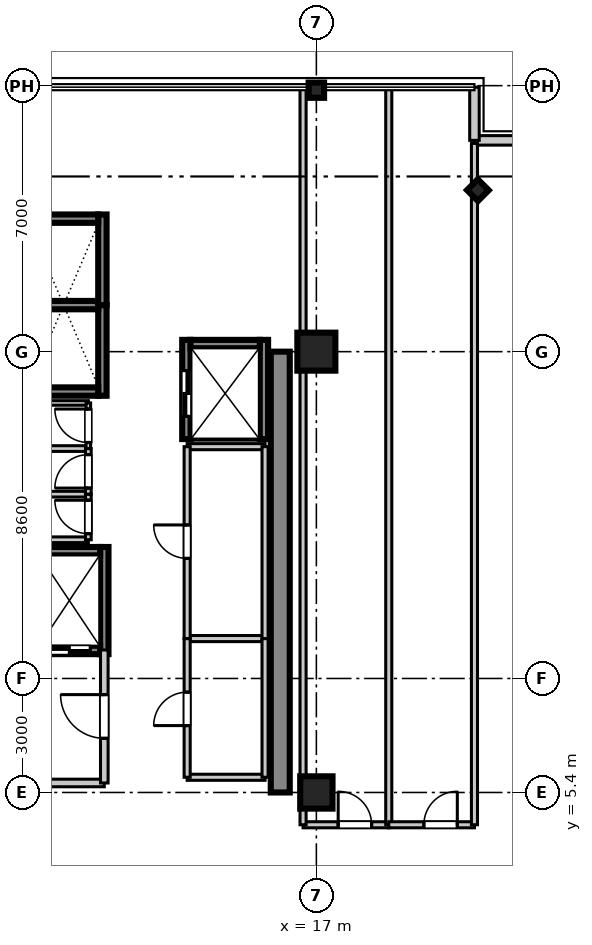
"""IFC4 building model, lengths in metres.
Left out: names, types, materials, properties, quantities, classifications, styles, units other than length and angle.
Written with IfcOpenShell. Run it as: python <this file> out.ifc"""

import sys

from ifc_helpers import new_model, si_unit, direction, frame, frame_2d, origin, origin_2d, place, context, subcontext, project, spatial, rectangle, i_section, extrude, source, transform, mapped, element, fill, save


model = new_model("IFC4")
c1 = context("Model", 3, precision=1e-05, world=origin(), true_north=direction((0.0, 1.0)))
c2 = subcontext(c1, "Body", "Model", "MODEL_VIEW")
j1 = project(units=[si_unit("LENGTHUNIT", "METRE"), si_unit("PLANEANGLEUNIT", "RADIAN")], contexts=[c1])
p1 = place(None, origin())
s1 = spatial("IfcSite", under=j1, at=p1, CompositionType="ELEMENT")
p2 = place(p1, origin())
s2 = spatial("IfcBuilding", under=s1, at=p2, CompositionType="ELEMENT")
p3 = place(p2, frame((0.0, 0.0, 234.5)))
s3 = spatial("IfcBuildingStorey", under=s2, at=p3, CompositionType="ELEMENT", Elevation=234.5)
m1 = source(origin(), c2, "Body", "SweptSolid", [
    extrude(rectangle(XDim=0.85, YDim=0.85, at=origin_2d()), origin(), (0.0, 0.0, 1.0), 3.655),
])
p4 = place(p3, frame((17.0, 5.4, 0.0), z_axis=(0.0, 0.0, 1.0), x_axis=(1.0, 0.0, 0.0)))
e1 = element("IfcColumn", 1, at=p4, inside=s3, PredefinedType="PILASTER", context=c2, shape_type="MappedRepresentation", body=[
    mapped(m1, transform((0.0, 0.0, 0.0), scale=1.0)),
])
m2 = source(origin(), c2, "Body", "SweptSolid", [
    extrude(rectangle(XDim=1.0, YDim=1.0, at=origin_2d()), origin(), (0.0, 0.0, 1.0), 3.655),
])
p5 = place(p3, frame((17.0, 17.0, 0.0), z_axis=(0.0, 0.0, 1.0), x_axis=(1.0, 0.0, 0.0)))
e2 = element("IfcColumn", 2, at=p5, inside=s3, PredefinedType="COLUMN", context=c2, shape_type="MappedRepresentation", body=[
    mapped(m2, transform((0.0, 0.0, 0.0), scale=1.0)),
])
m3 = source(origin(), c2, "Body", "SweptSolid", [
    extrude(i_section(OverallWidth=0.401, OverallDepth=0.406, WebThickness=0.016, FlangeThickness=0.025, at=origin_2d()), origin(), (0.0, 0.0, 1.0), 3.655),
])
for number, where, z_axis, x_axis in (
    (3, (17.0, 23.88, 0.0), (0.0, 0.0, 1.0), (0.0, 1.0, 0.0)),
    (4, (21.25, 21.25, 0.0), (0.0, 0.0, 1.0), (0.707, 0.707, 0.0)),
):
    element("IfcColumn", number, at=place(p3, frame(where, z_axis=z_axis, x_axis=x_axis)), inside=s3, PredefinedType="COLUMN", context=c2, shape_type="MappedRepresentation", body=[
        mapped(m3, transform((0.0, 0.0, 0.0), scale=1.0)),
    ])
m4 = source(origin(), c2, "Body", "SweptSolid", [
    extrude(rectangle(XDim=11.6, YDim=0.5, at=frame_2d((5.8, 0.0))), origin(), (0.0, 0.0, 1.0), 3.41),
])
p6 = place(p3, frame((16.05, 5.4, 0.0), z_axis=(0.0, 0.0, 1.0), x_axis=(0.0, 1.0, 0.0)))
e5 = element("IfcWall", 5, at=p6, inside=s3, PredefinedType="SHEAR", context=c2, shape_type="MappedRepresentation", body=[
    mapped(m4, transform((0.0, 0.0, 0.0), scale=1.0)),
])
m5 = source(origin(), c2, "Body", "SweptSolid", [
    extrude(rectangle(XDim=2.385, YDim=0.22, at=frame_2d((1.192, 0.0))), origin(), (0.0, 0.0, 1.0), 3.41),
])
p7 = place(p3, frame((11.37, 15.84, 0.0), z_axis=(0.0, 0.0, 1.0), x_axis=(0.0, 1.0, 0.0)))
e6 = element("IfcWall", 6, at=p7, inside=s3, PredefinedType="SHEAR", context=c2, shape_type="MappedRepresentation", body=[
    mapped(m5, transform((0.0, 0.0, 0.0), scale=1.0)),
])
m6 = source(origin(), c2, "Body", "SweptSolid", [
    extrude(rectangle(XDim=1.82, YDim=0.22, at=frame_2d((0.91, 0.0))), origin(), (0.0, 0.0, 1.0), 3.41),
])
p8 = place(p3, frame((9.44, 15.95, 0.0), z_axis=(0.0, 0.0, 1.0), x_axis=(1.0, 0.0, 0.0)))
e7 = element("IfcWall", 7, at=p8, inside=s3, PredefinedType="SHEAR", context=c2, shape_type="MappedRepresentation", body=[
    mapped(m6, transform((0.0, 0.0, 0.0), scale=1.0)),
])
m7 = source(origin(), c2, "Body", "SweptSolid", [
    extrude(rectangle(XDim=1.82, YDim=0.22, at=frame_2d((0.91, 0.0))), origin(), (0.0, 0.0, 1.0), 3.7),
])
p9 = place(p3, frame((9.44, 18.225, 0.0), z_axis=(0.0, 0.0, 1.0), x_axis=(1.0, 0.0, 0.0)))
e8 = element("IfcWall", 8, at=p9, inside=s3, PredefinedType="SHEAR", context=c2, shape_type="MappedRepresentation", body=[
    mapped(m7, transform((0.0, 0.0, 0.0), scale=1.0)),
])
p10 = place(p3, frame((11.37, 18.225, 0.0), z_axis=(0.0, 0.0, 1.0), x_axis=(0.0, 1.0, 0.0)))
e9 = element("IfcWall", 9, at=p10, inside=s3, PredefinedType="SHEAR", context=c2, shape_type="MappedRepresentation", body=[
    mapped(m5, transform((0.0, 0.0, 0.0), scale=1.0)),
])
p11 = place(p3, frame((9.44, 20.5, 0.0), z_axis=(0.0, 0.0, 1.0), x_axis=(1.0, 0.0, 0.0)))
e10 = element("IfcWall", 10, at=p11, inside=s3, PredefinedType="SHEAR", context=c2, shape_type="MappedRepresentation", body=[
    mapped(m6, transform((0.0, 0.0, 0.0), scale=1.0)),
])
m8 = source(origin(), c2, "Body", "SweptSolid", [
    extrude(rectangle(XDim=2.82, YDim=0.22, at=frame_2d((1.41, 0.0))), origin(), (0.0, 0.0, 1.0), 3.41),
])
p12 = place(p3, frame((11.42, 9.04, 0.0), z_axis=(0.0, 0.0, 1.0), x_axis=(0.0, 1.0, 0.0)))
e11 = element("IfcWall", 11, at=p12, inside=s3, PredefinedType="SHEAR", context=c2, shape_type="MappedRepresentation", body=[
    mapped(m8, transform((0.0, 0.0, 0.0), scale=1.0)),
])
m9 = source(origin(), c2, "Body", "SweptSolid", [
    extrude(rectangle(XDim=1.62, YDim=0.22, at=frame_2d((0.81, 0.0))), origin(), (0.0, 0.0, 1.0), 3.41),
])
p13 = place(p3, frame((9.69, 9.15, 0.0), z_axis=(0.0, 0.0, 1.0), x_axis=(1.0, 0.0, 0.0)))
e12 = element("IfcWall", 12, at=p13, inside=s3, PredefinedType="SHEAR", context=c2, shape_type="MappedRepresentation", body=[
    mapped(m9, transform((0.0, 0.0, 0.0), scale=1.0)),
])
p14 = place(p13, frame((0.26, 0.0, 0.0)))
e13 = element("IfcOpeningElement", 13, at=p14, cuts=e12, PredefinedType="OPENING", context=c2, shape_type="SweptSolid", body=[
    extrude(rectangle(XDim=1.1, YDim=2.2, at=frame_2d((0.55, 1.1))), frame((0.0, 0.12, 0.0), z_axis=(0.0, -1.0, 0.0), x_axis=(1.0, 0.0, 0.0)), (0.0, 0.0, 1.0), 0.24),
])
p15 = place(p3, frame((9.69, 11.75, 0.0), z_axis=(0.0, 0.0, 1.0), x_axis=(1.0, 0.0, 0.0)))
e14 = element("IfcWall", 14, at=p15, inside=s3, PredefinedType="SHEAR", context=c2, shape_type="MappedRepresentation", body=[
    mapped(m9, transform((0.0, 0.0, 0.0), scale=1.0)),
])
m10 = source(origin(), c2, "Body", "SweptSolid", [
    extrude(rectangle(XDim=2.61, YDim=0.22, at=frame_2d((1.305, 0.0))), origin(), (0.0, 0.0, 1.0), 3.41),
])
p16 = place(p3, frame((13.58, 14.7, 0.0), z_axis=(0.0, 0.0, 1.0), x_axis=(0.0, 1.0, 0.0)))
e15 = element("IfcWall", 15, at=p16, inside=s3, PredefinedType="SHEAR", context=c2, shape_type="MappedRepresentation", body=[
    mapped(m10, transform((0.0, 0.0, 0.0), scale=1.0)),
])
p17 = place(p16, frame((0.6, 0.0, 0.0)))
e16 = element("IfcOpeningElement", 16, at=p17, cuts=e15, PredefinedType="OPENING", context=c2, shape_type="SweptSolid", body=[
    extrude(rectangle(XDim=1.2, YDim=2.2, at=frame_2d((0.6, 1.1))), frame((0.0, 0.12, 0.0), z_axis=(0.0, -1.0, 0.0), x_axis=(1.0, 0.0, 0.0)), (0.0, 0.0, 1.0), 0.24),
])
p18 = place(p3, frame((15.62, 14.7, 0.0), z_axis=(0.0, 0.0, 1.0), x_axis=(0.0, 1.0, 0.0)))
e17 = element("IfcWall", 17, at=p18, inside=s3, PredefinedType="SHEAR", context=c2, shape_type="MappedRepresentation", body=[
    mapped(m10, transform((0.0, 0.0, 0.0), scale=1.0)),
])
p19 = place(p3, frame((13.69, 17.2, 0.0), z_axis=(0.0, 0.0, 1.0), x_axis=(1.0, 0.0, 0.0)))
e18 = element("IfcWall", 18, at=p19, inside=s3, PredefinedType="SHEAR", context=c2, shape_type="MappedRepresentation", body=[
    mapped(m6, transform((0.0, 0.0, 0.0), scale=1.0)),
])
m11 = source(origin(), c2, "Body", "SweptSolid", [
    extrude(rectangle(XDim=1.4, YDim=0.25, at=frame_2d((0.7, 0.0))), origin(), (0.0, 0.0, 1.0), 3.41),
])
p20 = place(p3, frame((21.16, 22.56, 0.0), z_axis=(0.0, 0.0, 1.0), x_axis=(1.0, 0.0, 0.0)))
e19 = element("IfcWall", 19, at=p20, inside=s3, PredefinedType="STANDARD", context=c2, shape_type="MappedRepresentation", body=[
    mapped(m11, transform((0.0, 0.0, 0.0), scale=1.0)),
])
m12 = source(origin(), c2, "Body", "SweptSolid", [
    extrude(rectangle(XDim=1.4, YDim=0.25, at=frame_2d((0.7, 0.0))), origin(), (0.0, 0.0, 1.0), 3.41),
])
p21 = place(p3, frame((21.16, 22.56, 0.0), z_axis=(0.0, 0.0, 1.0), x_axis=(0.0, 1.0, 0.0)))
e20 = element("IfcWall", 20, at=p21, inside=s3, PredefinedType="STANDARD", context=c2, shape_type="MappedRepresentation", body=[
    mapped(m12, transform((0.0, 0.0, 0.0), scale=1.0)),
])
m13 = source(origin(), c2, "Body", "SweptSolid", [
    extrude(rectangle(XDim=3.82, YDim=0.2, at=frame_2d((1.91, 0.0))), origin(), (0.0, 0.0, 1.0), 2.75),
])
p22 = place(p3, frame((7.6, 5.65, 0.0), z_axis=(0.0, 0.0, 1.0), x_axis=(1.0, 0.0, 0.0)))
e21 = element("IfcWall", 21, at=p22, inside=s3, PredefinedType="PARTITIONING", context=c2, shape_type="MappedRepresentation", body=[
    mapped(m13, transform((0.0, 0.0, 0.0), scale=1.0)),
])
m14 = source(origin(), c2, "Body", "SweptSolid", [
    extrude(rectangle(XDim=3.5, YDim=0.2, at=frame_2d((1.75, 0.0))), origin(), (0.0, 0.0, 1.0), 2.75),
])
p23 = place(p3, frame((11.42, 5.65, 0.0), z_axis=(0.0, 0.0, 1.0), x_axis=(0.0, 1.0, 0.0)))
e22 = element("IfcWall", 22, at=p23, inside=s3, PredefinedType="PARTITIONING", context=c2, shape_type="MappedRepresentation", body=[
    mapped(m14, transform((0.0, 0.0, 0.0), scale=1.0)),
])
p24 = place(p23, frame((1.175, 0.0, 0.0)))
e23 = element("IfcOpeningElement", 23, at=p24, cuts=e22, PredefinedType="OPENING", context=c2, shape_type="SweptSolid", body=[
    extrude(rectangle(XDim=1.15, YDim=2.15, at=frame_2d((0.575, 1.075))), frame((0.0, 0.11, 0.0), z_axis=(0.0, -1.0, 0.0), x_axis=(1.0, 0.0, 0.0)), (0.0, 0.0, 1.0), 0.22),
])
m15 = source(origin(), c2, "Body", "SweptSolid", [
    extrude(rectangle(XDim=1.75, YDim=0.15, at=frame_2d((0.875, 0.0))), origin(), (0.0, 0.0, 1.0), 2.75),
])
for number, where, z_axis, x_axis in (
    (24, (9.25, 12.05, 0.0), (0.0, 0.0, 1.0), (1.0, 0.0, 0.0)),
    (25, (9.25, 13.25, 0.0), (0.0, 0.0, 1.0), (1.0, 0.0, 0.0)),
):
    element("IfcWall", number, at=place(p3, frame(where, z_axis=z_axis, x_axis=x_axis)), inside=s3, PredefinedType="PARTITIONING", context=c2, shape_type="MappedRepresentation", body=[
        mapped(m15, transform((0.0, 0.0, 0.0), scale=1.0)),
    ])
m16 = source(origin(), c2, "Body", "SweptSolid", [
    extrude(rectangle(XDim=1.2, YDim=0.15, at=frame_2d((0.6, 0.0))), origin(), (0.0, 0.0, 1.0), 2.75),
])
p25 = place(p3, frame((11.0, 12.05, 0.0), z_axis=(0.0, 0.0, 1.0), x_axis=(0.0, 1.0, 0.0)))
e26 = element("IfcWall", 26, at=p25, inside=s3, PredefinedType="PARTITIONING", context=c2, shape_type="MappedRepresentation", body=[
    mapped(m16, transform((0.0, 0.0, 0.0), scale=1.0)),
])
p26 = place(p25, frame((0.16, 0.0, 0.0)))
e27 = element("IfcOpeningElement", 27, at=p26, cuts=e26, PredefinedType="OPENING", context=c2, shape_type="SweptSolid", body=[
    extrude(rectangle(XDim=0.88, YDim=2.1, at=frame_2d((0.44, 1.05))), frame((0.0, 0.085, 0.0), z_axis=(0.0, -1.0, 0.0), x_axis=(1.0, 0.0, 0.0)), (0.0, 0.0, 1.0), 0.17),
])
p27 = place(p3, frame((9.25, 14.45, 0.0), z_axis=(0.0, 0.0, 1.0), x_axis=(1.0, 0.0, 0.0)))
e28 = element("IfcWall", 28, at=p27, inside=s3, PredefinedType="PARTITIONING", context=c2, shape_type="MappedRepresentation", body=[
    mapped(m15, transform((0.0, 0.0, 0.0), scale=1.0)),
])
p28 = place(p3, frame((11.0, 13.25, 0.0), z_axis=(0.0, 0.0, 1.0), x_axis=(0.0, 1.0, 0.0)))
e29 = element("IfcWall", 29, at=p28, inside=s3, PredefinedType="PARTITIONING", context=c2, shape_type="MappedRepresentation", body=[
    mapped(m16, transform((0.0, 0.0, 0.0), scale=1.0)),
])
p29 = place(p28, frame((0.16, 0.0, 0.0)))
e30 = element("IfcOpeningElement", 30, at=p29, cuts=e29, PredefinedType="OPENING", context=c2, shape_type="SweptSolid", body=[
    extrude(rectangle(XDim=0.88, YDim=2.1, at=frame_2d((0.44, 1.05))), frame((0.0, 0.085, 0.0), z_axis=(0.0, -1.0, 0.0), x_axis=(1.0, 0.0, 0.0)), (0.0, 0.0, 1.0), 0.17),
])
m17 = source(origin(), c2, "Body", "SweptSolid", [
    extrude(rectangle(XDim=1.75, YDim=0.12, at=frame_2d((0.875, 0.0))), origin(), (0.0, 0.0, 1.0), 2.75),
])
p30 = place(p3, frame((9.25, 15.65, 0.0), z_axis=(0.0, 0.0, 1.0), x_axis=(1.0, 0.0, 0.0)))
e31 = element("IfcWall", 31, at=p30, inside=s3, PredefinedType="PARTITIONING", context=c2, shape_type="MappedRepresentation", body=[
    mapped(m17, transform((0.0, 0.0, 0.0), scale=1.0)),
])
m18 = source(origin(), c2, "Body", "SweptSolid", [
    extrude(rectangle(XDim=1.2, YDim=0.12, at=frame_2d((0.6, 0.0))), origin(), (0.0, 0.0, 1.0), 2.75),
])
p31 = place(p3, frame((11.0, 14.45, 0.0), z_axis=(0.0, 0.0, 1.0), x_axis=(0.0, 1.0, 0.0)))
e32 = element("IfcWall", 32, at=p31, inside=s3, PredefinedType="PARTITIONING", context=c2, shape_type="MappedRepresentation", body=[
    mapped(m18, transform((0.0, 0.0, 0.0), scale=1.0)),
])
p32 = place(p31, frame((0.16, 0.0, 0.0)))
e33 = element("IfcOpeningElement", 33, at=p32, cuts=e32, PredefinedType="OPENING", context=c2, shape_type="SweptSolid", body=[
    extrude(rectangle(XDim=0.88, YDim=2.1, at=frame_2d((0.44, 1.05))), frame((0.0, 0.07, 0.0), z_axis=(0.0, -1.0, 0.0), x_axis=(1.0, 0.0, 0.0)), (0.0, 0.0, 1.0), 0.14),
])
m19 = source(origin(), c2, "Body", "SweptSolid", [
    extrude(rectangle(XDim=2.05, YDim=0.16, at=frame_2d((1.025, 0.0))), origin(), (0.0, 0.0, 1.0), 2.75),
])
for number, where, z_axis, x_axis in (
    (34, (13.6, 5.8, 0.0), (0.0, 0.0, 1.0), (1.0, 0.0, 0.0)),
    (35, (13.6, 9.45, 0.0), (0.0, 0.0, 1.0), (1.0, 0.0, 0.0)),
):
    element("IfcWall", number, at=place(p3, frame(where, z_axis=z_axis, x_axis=x_axis)), inside=s3, PredefinedType="PARTITIONING", context=c2, shape_type="MappedRepresentation", body=[
        mapped(m19, transform((0.0, 0.0, 0.0), scale=1.0)),
    ])
m20 = source(origin(), c2, "Body", "SweptSolid", [
    extrude(rectangle(XDim=3.65, YDim=0.16, at=frame_2d((1.825, 0.0))), origin(), (0.0, 0.0, 1.0), 2.75),
])
p33 = place(p3, frame((13.6, 5.8, 0.0), z_axis=(0.0, 0.0, 1.0), x_axis=(0.0, 1.0, 0.0)))
e36 = element("IfcWall", 36, at=p33, inside=s3, PredefinedType="PARTITIONING", context=c2, shape_type="MappedRepresentation", body=[
    mapped(m20, transform((0.0, 0.0, 0.0), scale=1.0)),
])
p34 = place(p33, frame((1.36, 0.0, 0.0)))
e37 = element("IfcOpeningElement", 37, at=p34, cuts=e36, PredefinedType="OPENING", context=c2, shape_type="SweptSolid", body=[
    extrude(rectangle(XDim=0.88, YDim=2.1, at=frame_2d((0.44, 1.05))), frame((0.0, 0.09, 0.0), z_axis=(0.0, -1.0, 0.0), x_axis=(1.0, 0.0, 0.0)), (0.0, 0.0, 1.0), 0.18),
])
p35 = place(p3, frame((15.65, 5.8, 0.0), z_axis=(0.0, 0.0, 1.0), x_axis=(0.0, 1.0, 0.0)))
e38 = element("IfcWall", 38, at=p35, inside=s3, PredefinedType="PARTITIONING", context=c2, shape_type="MappedRepresentation", body=[
    mapped(m20, transform((0.0, 0.0, 0.0), scale=1.0)),
])
p36 = place(p3, frame((13.6, 14.5, 0.0), z_axis=(0.0, 0.0, 1.0), x_axis=(1.0, 0.0, 0.0)))
e39 = element("IfcWall", 39, at=p36, inside=s3, PredefinedType="PARTITIONING", context=c2, shape_type="MappedRepresentation", body=[
    mapped(m19, transform((0.0, 0.0, 0.0), scale=1.0)),
])
m21 = source(origin(), c2, "Body", "SweptSolid", [
    extrude(rectangle(XDim=5.05, YDim=0.16, at=frame_2d((2.525, 0.0))), origin(), (0.0, 0.0, 1.0), 2.75),
])
p37 = place(p3, frame((13.6, 9.45, 0.0), z_axis=(0.0, 0.0, 1.0), x_axis=(0.0, 1.0, 0.0)))
e40 = element("IfcWall", 40, at=p37, inside=s3, PredefinedType="PARTITIONING", context=c2, shape_type="MappedRepresentation", body=[
    mapped(m21, transform((0.0, 0.0, 0.0), scale=1.0)),
])
p38 = place(p37, frame((2.11, 0.0, 0.0)))
e41 = element("IfcOpeningElement", 41, at=p38, cuts=e40, PredefinedType="OPENING", context=c2, shape_type="SweptSolid", body=[
    extrude(rectangle(XDim=0.88, YDim=2.1, at=frame_2d((0.44, 1.05))), frame((0.0, 0.09, 0.0), z_axis=(0.0, -1.0, 0.0), x_axis=(1.0, 0.0, 0.0)), (0.0, 0.0, 1.0), 0.18),
])
p39 = place(p3, frame((15.65, 9.45, 0.0), z_axis=(0.0, 0.0, 1.0), x_axis=(0.0, 1.0, 0.0)))
e42 = element("IfcWall", 42, at=p39, inside=s3, PredefinedType="PARTITIONING", context=c2, shape_type="MappedRepresentation", body=[
    mapped(m21, transform((0.0, 0.0, 0.0), scale=1.0)),
])
m22 = source(origin(), c2, "Body", "SweptSolid", [
    extrude(rectangle(XDim=2.255, YDim=0.16, at=frame_2d((1.127, 0.0))), origin(), (0.0, 0.0, 1.0), 2.75),
])
p40 = place(p3, frame((16.65, 4.55, 0.0), z_axis=(0.0, 0.0, 1.0), x_axis=(1.0, 0.0, 0.0)))
e43 = element("IfcWall", 43, at=p40, inside=s3, PredefinedType="PARTITIONING", context=c2, shape_type="MappedRepresentation", body=[
    mapped(m22, transform((0.0, 0.0, 0.0), scale=1.0)),
])
p41 = place(p40, frame((0.924, 0.0, 0.0)))
e44 = element("IfcOpeningElement", 44, at=p41, cuts=e43, PredefinedType="OPENING", context=c2, shape_type="SweptSolid", body=[
    extrude(rectangle(XDim=0.88, YDim=2.1, at=frame_2d((0.44, 1.05))), frame((0.0, 0.09, 0.0), z_axis=(0.0, -1.0, 0.0), x_axis=(1.0, 0.0, 0.0)), (0.0, 0.0, 1.0), 0.18),
])
m23 = source(origin(), c2, "Body", "SweptSolid", [
    extrude(rectangle(XDim=19.35, YDim=0.16, at=frame_2d((9.675, 0.0))), origin(), (0.0, 0.0, 1.0), 2.75),
])
for number, where, z_axis, x_axis in (
    (45, (16.65, 4.55, 0.0), (0.0, 0.0, 1.0), (0.0, 1.0, 0.0)),
    (46, (18.905, 4.55, 0.0), (0.0, 0.0, 1.0), (0.0, 1.0, 0.0)),
):
    element("IfcWall", number, at=place(p3, frame(where, z_axis=z_axis, x_axis=x_axis)), inside=s3, PredefinedType="PARTITIONING", context=c2, shape_type="MappedRepresentation", body=[
        mapped(m23, transform((0.0, 0.0, 0.0), scale=1.0)),
    ])
m24 = source(origin(), c2, "Body", "SweptSolid", [
    extrude(rectangle(XDim=2.255, YDim=0.16, at=frame_2d((1.127, 0.0))), origin(), (0.0, 0.0, 1.0), 2.75),
])
p42 = place(p3, frame((18.905, 4.55, 0.0), z_axis=(0.0, 0.0, 1.0), x_axis=(1.0, 0.0, 0.0)))
e47 = element("IfcWall", 47, at=p42, inside=s3, PredefinedType="PARTITIONING", context=c2, shape_type="MappedRepresentation", body=[
    mapped(m24, transform((0.0, 0.0, 0.0), scale=1.0)),
])
p43 = place(p42, frame((0.924, 0.0, 0.0)))
e48 = element("IfcOpeningElement", 48, at=p43, cuts=e47, PredefinedType="OPENING", context=c2, shape_type="SweptSolid", body=[
    extrude(rectangle(XDim=0.88, YDim=2.1, at=frame_2d((0.44, 1.05))), frame((0.0, 0.09, 0.0), z_axis=(0.0, -1.0, 0.0), x_axis=(1.0, 0.0, 0.0)), (0.0, 0.0, 1.0), 0.18),
])
m25 = source(origin(), c2, "Body", "SweptSolid", [
    extrude(rectangle(XDim=17.93, YDim=0.16, at=frame_2d((8.965, 0.0))), origin(), (0.0, 0.0, 1.0), 2.75),
])
p44 = place(p3, frame((21.16, 4.55, 0.0), z_axis=(0.0, 0.0, 1.0), x_axis=(0.0, 1.0, 0.0)))
e49 = element("IfcWall", 49, at=p44, inside=s3, PredefinedType="PARTITIONING", context=c2, shape_type="MappedRepresentation", body=[
    mapped(m25, transform((0.0, 0.0, 0.0), scale=1.0)),
])
m26 = source(origin(), c2, "Body", "SweptSolid", [
    extrude(rectangle(XDim=1.1, YDim=2.2, at=frame_2d((0.55, 1.1))), frame((0.0, 0.025, 0.0), z_axis=(0.0, -1.0, 0.0), x_axis=(1.0, 0.0, 0.0)), (0.0, 0.0, 1.0), 0.05),
])
p45 = place(p14, frame((1.1, 0.0, 0.0), z_axis=(0.0, 0.0, 1.0), x_axis=(-1.0, 0.0, 0.0)))
e50 = element("IfcDoor", 50, at=p45, inside=s3, OperationType="DOUBLE_DOOR_SLIDING", PredefinedType="DOOR", context=c2, shape_type="MappedRepresentation", body=[
    mapped(m26, transform((0.0, 0.0, 0.0), scale=1.0)),
])
fill(e13, e50)
m27 = source(origin(), c2, "Body", "SweptSolid", [
    extrude(rectangle(XDim=1.2, YDim=2.2, at=frame_2d((0.6, 1.1))), frame((0.0, 0.025, 0.0), z_axis=(0.0, -1.0, 0.0), x_axis=(1.0, 0.0, 0.0)), (0.0, 0.0, 1.0), 0.05),
])
p46 = place(p17, origin())
e51 = element("IfcDoor", 51, at=p46, inside=s3, OperationType="DOUBLE_DOOR_SLIDING", PredefinedType="DOOR", context=c2, shape_type="MappedRepresentation", body=[
    mapped(m27, transform((0.0, 0.0, 0.0), scale=1.0)),
])
fill(e16, e51)
m28 = source(origin(), c2, "Body", "SweptSolid", [
    extrude(rectangle(XDim=1.15, YDim=2.15, at=frame_2d((0.575, 1.075))), frame((0.0, 0.025, 0.0), z_axis=(0.0, -1.0, 0.0), x_axis=(1.0, 0.0, 0.0)), (0.0, 0.0, 1.0), 0.05),
])
p47 = place(p24, frame((1.15, 0.0, 0.0), z_axis=(0.0, 0.0, 1.0), x_axis=(-1.0, 0.0, 0.0)))
e52 = element("IfcDoor", 52, at=p47, inside=s3, OperationType="SINGLE_SWING_RIGHT", PredefinedType="DOOR", context=c2, shape_type="MappedRepresentation", body=[
    mapped(m28, transform((0.0, 0.0, 0.0), scale=1.0)),
])
fill(e23, e52)
m29 = source(origin(), c2, "Body", "SweptSolid", [
    extrude(rectangle(XDim=0.88, YDim=2.1, at=frame_2d((0.44, 1.05))), frame((0.0, 0.025, 0.0), z_axis=(0.0, -1.0, 0.0), x_axis=(1.0, 0.0, 0.0)), (0.0, 0.0, 1.0), 0.05),
])
p48 = place(p26, origin())
e53 = element("IfcDoor", 53, at=p48, inside=s3, OperationType="SINGLE_SWING_RIGHT", PredefinedType="DOOR", context=c2, shape_type="MappedRepresentation", body=[
    mapped(m29, transform((0.0, 0.0, 0.0), scale=1.0)),
])
fill(e27, e53)
p49 = place(p29, origin())
e54 = element("IfcDoor", 54, at=p49, inside=s3, OperationType="SINGLE_SWING_LEFT", PredefinedType="DOOR", context=c2, shape_type="MappedRepresentation", body=[
    mapped(m29, transform((0.0, 0.0, 0.0), scale=1.0)),
])
fill(e30, e54)
p50 = place(p32, origin())
e55 = element("IfcDoor", 55, at=p50, inside=s3, OperationType="SINGLE_SWING_RIGHT", PredefinedType="DOOR", context=c2, shape_type="MappedRepresentation", body=[
    mapped(m29, transform((0.0, 0.0, 0.0), scale=1.0)),
])
fill(e33, e55)
p51 = place(p34, frame((0.88, 0.0, 0.0), z_axis=(0.0, 0.0, 1.0), x_axis=(-1.0, 0.0, 0.0)))
e56 = element("IfcDoor", 56, at=p51, inside=s3, OperationType="SINGLE_SWING_LEFT", PredefinedType="DOOR", context=c2, shape_type="MappedRepresentation", body=[
    mapped(m29, transform((0.0, 0.0, 0.0), scale=1.0)),
])
fill(e37, e56)
p52 = place(p38, frame((0.88, 0.0, 0.0), z_axis=(0.0, 0.0, 1.0), x_axis=(-1.0, 0.0, 0.0)))
e57 = element("IfcDoor", 57, at=p52, inside=s3, OperationType="SINGLE_SWING_RIGHT", PredefinedType="DOOR", context=c2, shape_type="MappedRepresentation", body=[
    mapped(m29, transform((0.0, 0.0, 0.0), scale=1.0)),
])
fill(e41, e57)
p53 = place(p41, origin())
e58 = element("IfcDoor", 58, at=p53, inside=s3, OperationType="SINGLE_SWING_LEFT", PredefinedType="DOOR", context=c2, shape_type="MappedRepresentation", body=[
    mapped(m29, transform((0.0, 0.0, 0.0), scale=1.0)),
])
fill(e44, e58)
p54 = place(p43, origin())
e59 = element("IfcDoor", 59, at=p54, inside=s3, OperationType="SINGLE_SWING_RIGHT", PredefinedType="DOOR", context=c2, shape_type="MappedRepresentation", body=[
    mapped(m29, transform((0.0, 0.0, 0.0), scale=1.0)),
])
fill(e48, e59)
save(model, sys.argv[1])
